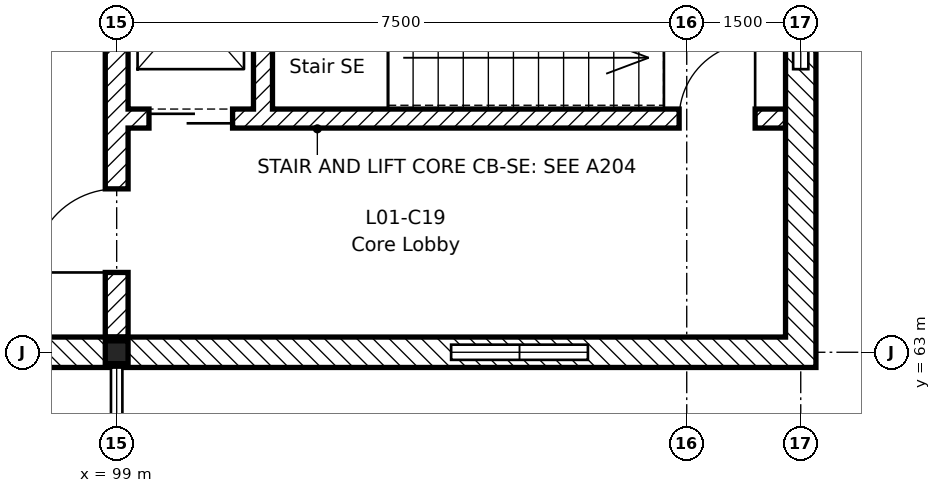
"""IFC4 building model, lengths in metres.
Left out: names, types, materials, properties, quantities, classifications, styles, units other than length and angle.
Written with IfcOpenShell. Run it as: python <this file> out.ifc"""

import sys

from ifc_helpers import new_model, si_unit, direction, frame, frame_2d, origin, origin_2d, place, context, subcontext, project, spatial, rectangle, i_section, extrude, element, fill, save


model = new_model("IFC4")
c1 = context("Model", 3, precision=1e-05, world=origin(), true_north=direction((0.0, 1.0)))
c2 = subcontext(c1, "Body", "Model", "MODEL_VIEW")
j1 = project(units=[si_unit("LENGTHUNIT", "METRE"), si_unit("PLANEANGLEUNIT", "RADIAN")], contexts=[c1])
p1 = place(None, origin())
s1 = spatial("IfcSite", under=j1, at=p1, CompositionType="ELEMENT")
p2 = place(p1, origin())
s2 = spatial("IfcBuilding", under=s1, at=p2, CompositionType="ELEMENT")
p3 = place(p2, frame((0.0, 0.0, 5.4)))
s3 = spatial("IfcBuildingStorey", under=s2, at=p3, CompositionType="ELEMENT", Elevation=5.4)
p4 = place(p3, frame((99.0, 63.0, -0.2), z_axis=(0.0, 0.0, 1.0), x_axis=(1.0, 0.0, 0.0)))
e1 = element("IfcColumn", 1, at=p4, inside=s3, PredefinedType="COLUMN", context=c2, shape_type="SweptSolid", body=[
    extrude(i_section(OverallWidth=0.3, OverallDepth=0.3, WebThickness=0.011, FlangeThickness=0.019, FilletRadius=0.027, at=origin_2d()), origin(), (0.0, 0.0, 1.0), 4.5),
])
p5 = place(p3, frame((99.0, 63.2, 0.0), z_axis=(0.0, 0.0, 1.0), x_axis=(0.0, 1.0, 0.0)))
e2 = element("IfcWall", 2, at=p5, inside=s3, PredefinedType="SHEAR", context=c2, shape_type="SweptSolid", body=[
    extrude(rectangle(XDim=8.95, YDim=0.3, at=frame_2d((4.475, 0.0))), origin(), (0.0, 0.0, 1.0), 4.3),
])
p6 = place(p5, frame((0.85, 0.0, 0.0)))
e3 = element("IfcOpeningElement", 3, at=p6, cuts=e2, PredefinedType="OPENING", context=c2, shape_type="SweptSolid", body=[
    extrude(rectangle(XDim=1.1, YDim=2.1, at=frame_2d((0.55, 1.05))), frame((0.0, 0.16, 0.0), z_axis=(0.0, -1.0, 0.0), x_axis=(1.0, 0.0, 0.0)), (0.0, 0.0, 1.0), 0.32),
])
p7 = place(p3, frame((107.8, 66.075, 0.0), z_axis=(0.0, 0.0, 1.0), x_axis=(-1.0, 0.0, 0.0)))
e4 = element("IfcWall", 4, at=p7, inside=s3, PredefinedType="SHEAR", context=c2, shape_type="SweptSolid", body=[
    extrude(rectangle(XDim=8.65, YDim=0.25, at=frame_2d((4.325, 0.0))), origin(), (0.0, 0.0, 1.0), 4.3),
])
p8 = place(p7, frame((0.4, 0.0, 0.0)))
e5 = element("IfcOpeningElement", 5, at=p8, cuts=e4, PredefinedType="OPENING", context=c2, shape_type="SweptSolid", body=[
    extrude(rectangle(XDim=1.0, YDim=2.1, at=frame_2d((0.5, 1.05))), frame((0.0, 0.135, 0.0), z_axis=(0.0, -1.0, 0.0), x_axis=(1.0, 0.0, 0.0)), (0.0, 0.0, 1.0), 0.27),
])
p9 = place(p7, frame((7.275, 0.0, 0.0)))
e6 = element("IfcOpeningElement", 6, at=p9, cuts=e4, PredefinedType="OPENING", context=c2, shape_type="SweptSolid", body=[
    extrude(rectangle(XDim=1.1, YDim=2.1, at=frame_2d((0.55, 1.05))), frame((0.0, 0.135, 0.0), z_axis=(0.0, -1.0, 0.0), x_axis=(1.0, 0.0, 0.0)), (0.0, 0.0, 1.0), 0.27),
])
p10 = place(p3, frame((100.925, 66.2, 0.0), z_axis=(0.0, 0.0, 1.0), x_axis=(0.0, 1.0, 0.0)))
e7 = element("IfcWall", 7, at=p10, inside=s3, PredefinedType="SHEAR", context=c2, shape_type="SweptSolid", body=[
    extrude(rectangle(XDim=2.85, YDim=0.25, at=frame_2d((1.425, 0.0))), origin(), (0.0, 0.0, 1.0), 4.3),
])
p11 = place(p3, frame((72.0, 63.0, 0.0), z_axis=(0.0, 0.0, 1.0), x_axis=(1.0, 0.0, 0.0)))
e8 = element("IfcWall", 8, at=p11, inside=s3, PredefinedType="STANDARD", context=c2, shape_type="SweptSolid", body=[
    extrude(rectangle(XDim=27.0, YDim=0.4, at=frame_2d((13.5, 0.0))), origin(), (0.0, 0.0, 1.0), 3.81),
])
p12 = place(p3, frame((99.0, 63.0, 0.0), z_axis=(0.0, 0.0, 1.0), x_axis=(1.0, 0.0, 0.0)))
e9 = element("IfcWall", 9, at=p12, inside=s3, PredefinedType="STANDARD", context=c2, shape_type="SweptSolid", body=[
    extrude(rectangle(XDim=4.4, YDim=0.4, at=frame_2d((2.2, 0.0))), origin(), (0.0, 0.0, 1.0), 4.3),
])
p13 = place(p3, frame((105.2, 63.0, 0.0), z_axis=(0.0, 0.0, 1.0), x_axis=(1.0, 0.0, 0.0)))
e10 = element("IfcWall", 10, at=p13, inside=s3, PredefinedType="STANDARD", context=c2, shape_type="SweptSolid", body=[
    extrude(rectangle(XDim=3.0, YDim=0.4, at=frame_2d((1.5, 0.0))), origin(), (0.0, 0.0, 1.0), 4.3),
])
p14 = place(p3, frame((103.4, 63.0, 0.0), z_axis=(0.0, 0.0, 1.0), x_axis=(1.0, 0.0, 0.0)))
e11 = element("IfcWall", 11, at=p14, inside=s3, PredefinedType="STANDARD", context=c2, shape_type="SweptSolid", body=[
    extrude(rectangle(XDim=1.8, YDim=0.4, at=frame_2d((0.9, 0.0))), origin(), (0.0, 0.0, 1.0), 0.9),
])
p15 = place(p3, frame((108.0, 63.2, 0.0), z_axis=(0.0, 0.0, 1.0), x_axis=(0.0, 1.0, 0.0)))
e12 = element("IfcWall", 12, at=p15, inside=s3, PredefinedType="STANDARD", context=c2, shape_type="SweptSolid", body=[
    extrude(rectangle(XDim=3.525, YDim=0.4, at=frame_2d((1.763, 0.0))), origin(), (0.0, 0.0, 1.0), 4.3),
])
p16 = place(p3, frame((108.0, 66.725, 0.0), z_axis=(0.0, 0.0, 1.0), x_axis=(0.0, 1.0, 0.0)))
e13 = element("IfcWall", 13, at=p16, inside=s3, PredefinedType="STANDARD", context=c2, shape_type="SweptSolid", body=[
    extrude(rectangle(XDim=1.8, YDim=0.4, at=frame_2d((0.9, 0.0))), origin(), (0.0, 0.0, 1.0), 0.9),
])
p17 = place(p8, frame((1.0, 0.0, 0.0), z_axis=(0.0, 0.0, 1.0), x_axis=(-1.0, 0.0, 0.0)))
e14 = element("IfcDoor", 14, at=p17, inside=s3, OperationType="SINGLE_SWING_RIGHT", PredefinedType="DOOR", context=c2, shape_type="SweptSolid", body=[
    extrude(rectangle(XDim=1.0, YDim=2.1, at=frame_2d((0.5, 1.05))), frame((0.0, 0.025, 0.0), z_axis=(0.0, -1.0, 0.0), x_axis=(1.0, 0.0, 0.0)), (0.0, 0.0, 1.0), 0.05),
])
fill(e5, e14)
p18 = place(p6, origin())
e15 = element("IfcDoor", 15, at=p18, inside=s3, OperationType="SINGLE_SWING_LEFT", PredefinedType="DOOR", context=c2, shape_type="SweptSolid", body=[
    extrude(rectangle(XDim=1.1, YDim=2.1, at=frame_2d((0.55, 1.05))), frame((0.0, 0.025, 0.0), z_axis=(0.0, -1.0, 0.0), x_axis=(1.0, 0.0, 0.0)), (0.0, 0.0, 1.0), 0.05),
])
fill(e3, e15)
p19 = place(p9, origin())
e16 = element("IfcDoor", 16, at=p19, inside=s3, OperationType="SLIDING_TO_LEFT", PredefinedType="DOOR", context=c2, shape_type="SweptSolid", body=[
    extrude(rectangle(XDim=1.1, YDim=2.1, at=frame_2d((0.55, 1.05))), frame((0.0, 0.025, 0.0), z_axis=(0.0, -1.0, 0.0), x_axis=(1.0, 0.0, 0.0)), (0.0, 0.0, 1.0), 0.05),
])
fill(e6, e16)
save(model, sys.argv[1])
